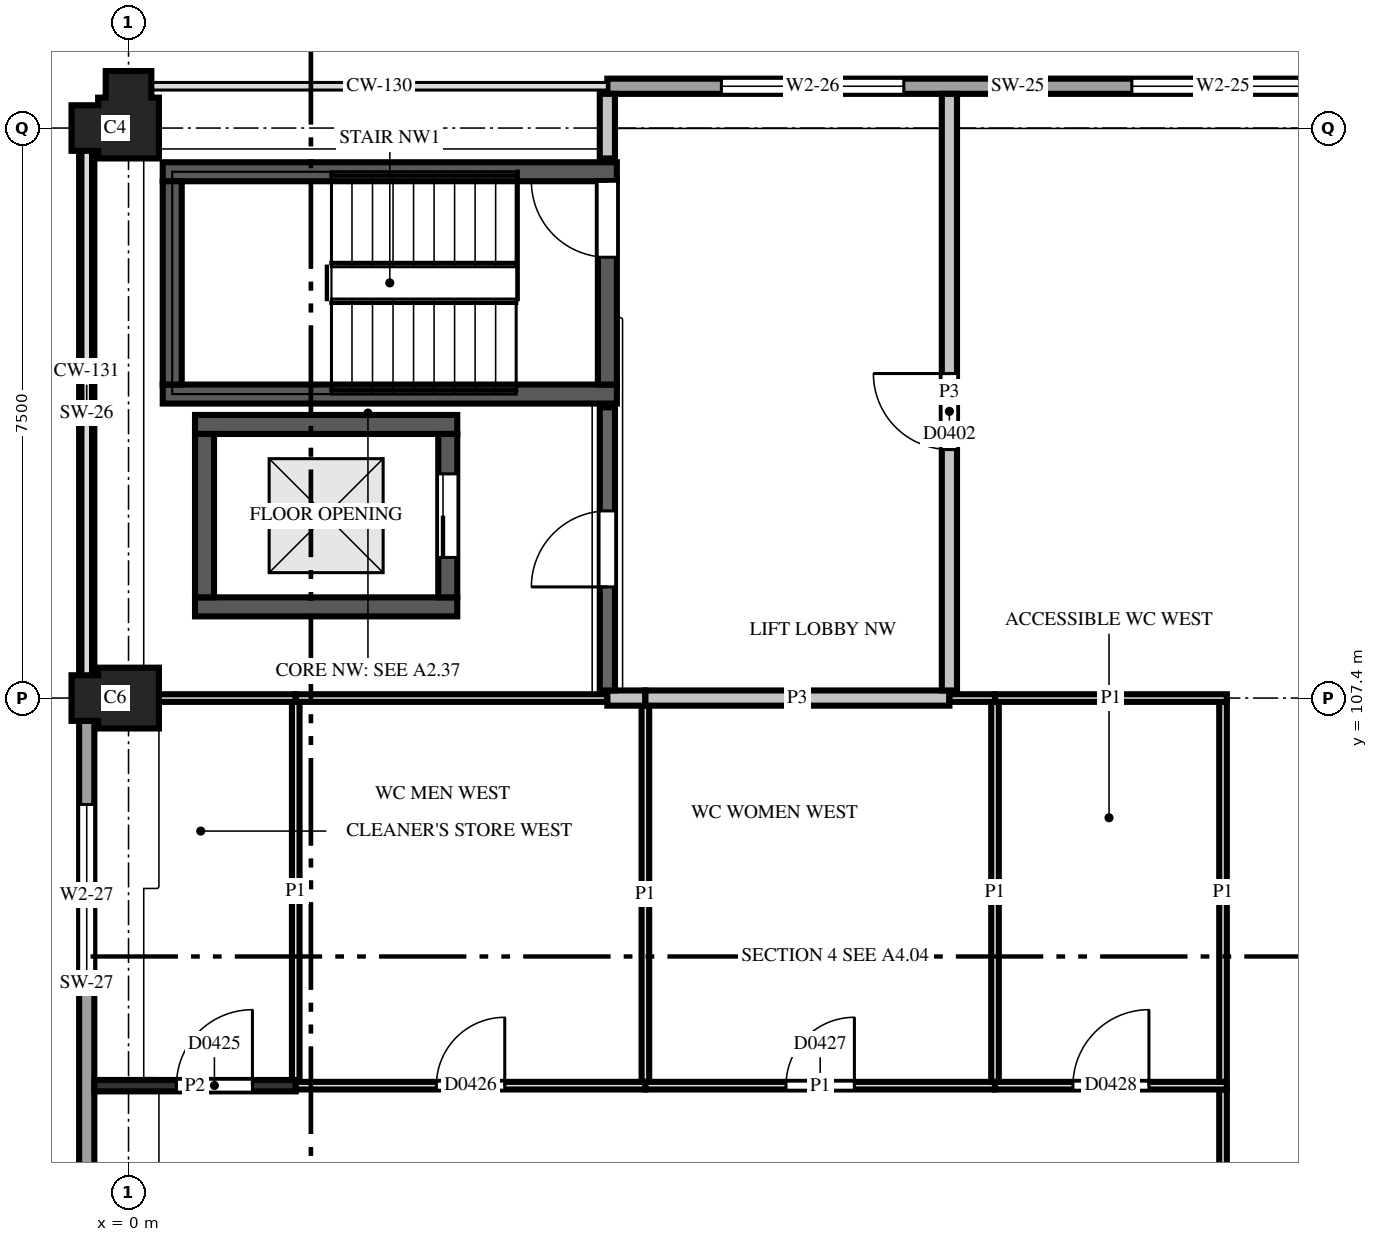
"""IFC4 building model, lengths in metres.
Left out: names, types, materials, properties, quantities, classifications, styles, units other than length and angle.
Written with IfcOpenShell. Run it as: python <this file> out.ifc"""

import sys

from ifc_helpers import new_model, si_unit, direction, frame, frame_2d, origin, place, context, subcontext, project, spatial, polyline, rectangle, outline, extrude, element, fill, save


model = new_model("IFC4")
c1 = context("Model", 3, precision=1e-05, world=origin(), true_north=direction((0.0, 1.0)))
c2 = subcontext(c1, "Body", "Model", "MODEL_VIEW")
j1 = project(units=[si_unit("LENGTHUNIT", "METRE"), si_unit("PLANEANGLEUNIT", "RADIAN")], contexts=[c1])
p1 = place(None, origin())
s1 = spatial("IfcSite", under=j1, at=p1, CompositionType="ELEMENT")
p2 = place(p1, origin())
s2 = spatial("IfcBuilding", under=s1, at=p2, CompositionType="ELEMENT")
p3 = place(p2, frame((0.0, 0.0, 15.6)))
s3 = spatial("IfcBuildingStorey", under=s2, at=p3, CompositionType="ELEMENT", Elevation=15.6)
p4 = place(p3, frame((0.0, 107.4, 0.0), z_axis=(0.0, 0.0, 1.0), x_axis=(-1.0, 0.0, 0.0)))
e1 = element("IfcColumn", 1, at=p4, inside=s3, PredefinedType="COLUMN", context=c2, shape_type="SweptSolid", body=[
    extrude(outline(polyline([(-0.4, -0.4), (0.4, -0.4), (0.4, -0.3), (0.75, -0.3), (0.75, 0.3), (0.4, 0.3), (0.4, 0.4), (-0.4, 0.4), (-0.4, -0.4)])), origin(), (0.0, 0.0, 1.0), 3.7),
])
p5 = place(p3, frame((0.0, 114.9, 0.0), z_axis=(0.0, 0.0, 1.0), x_axis=(0.0, 1.0, 0.0)))
e2 = element("IfcColumn", 2, at=p5, inside=s3, PredefinedType="COLUMN", context=c2, shape_type="SweptSolid", body=[
    extrude(outline(polyline([(-0.4, -0.4), (0.4, -0.4), (0.4, -0.3), (0.75, -0.3), (0.75, 0.3), (0.4, 0.3), (0.4, 0.4), (0.3, 0.4), (0.3, 0.75), (-0.3, 0.75), (-0.3, 0.4), (-0.4, 0.4), (-0.4, -0.4)])), origin(), (0.0, 0.0, 1.0), 3.7),
])
for number, where, z_axis, x_axis in (
    (3, (0.875, 108.6, 0.0), (0.0, 0.0, 1.0), (1.0, 0.0, 0.0)),
    (4, (0.875, 111.0, 0.0), (0.0, 0.0, 1.0), (1.0, 0.0, 0.0)),
):
    element("IfcWall", number, at=place(p3, frame(where, z_axis=z_axis, x_axis=x_axis)), inside=s3, PredefinedType="SHEAR", context=c2, shape_type="SweptSolid", body=[
        extrude(rectangle(XDim=3.45, YDim=0.25, at=frame_2d((1.725, 0.0))), origin(), (0.0, 0.0, 1.0), 3.7),
    ])
for number, where, z_axis, x_axis in (
    (5, (0.45, 111.4, 0.0), (0.0, 0.0, 1.0), (1.0, 0.0, 0.0)),
    (6, (0.45, 114.325, 0.0), (0.0, 0.0, 1.0), (1.0, 0.0, 0.0)),
):
    element("IfcWall", number, at=place(p3, frame(where, z_axis=z_axis, x_axis=x_axis)), inside=s3, PredefinedType="SHEAR", context=c2, shape_type="SweptSolid", body=[
        extrude(rectangle(XDim=5.975, YDim=0.25, at=frame_2d((2.988, 0.0))), origin(), (0.0, 0.0, 1.0), 3.7),
    ])
p6 = place(p3, frame((0.575, 111.525, 0.0), z_axis=(0.0, 0.0, 1.0), x_axis=(0.0, 1.0, 0.0)))
e7 = element("IfcWall", 7, at=p6, inside=s3, PredefinedType="SHEAR", context=c2, shape_type="SweptSolid", body=[
    extrude(rectangle(XDim=2.675, YDim=0.25, at=frame_2d((1.337, 0.0))), origin(), (0.0, 0.0, 1.0), 3.7),
])
p7 = place(p3, frame((1.0, 108.725, 0.0), z_axis=(0.0, 0.0, 1.0), x_axis=(0.0, 1.0, 0.0)))
e8 = element("IfcWall", 8, at=p7, inside=s3, PredefinedType="SHEAR", context=c2, shape_type="SweptSolid", body=[
    extrude(rectangle(XDim=2.15, YDim=0.25, at=frame_2d((1.075, 0.0))), origin(), (0.0, 0.0, 1.0), 3.7),
])
p8 = place(p3, frame((4.2, 108.725, 0.0), z_axis=(0.0, 0.0, 1.0), x_axis=(0.0, 1.0, 0.0)))
e9 = element("IfcWall", 9, at=p8, inside=s3, PredefinedType="SHEAR", context=c2, shape_type="SweptSolid", body=[
    extrude(rectangle(XDim=2.15, YDim=0.25, at=frame_2d((1.075, 0.0))), origin(), (0.0, 0.0, 1.0), 3.7),
])
p9 = place(p8, frame((0.525, 0.0, 0.0)))
e10 = element("IfcOpeningElement", 10, at=p9, cuts=e9, PredefinedType="OPENING", context=c2, shape_type="SweptSolid", body=[
    extrude(rectangle(XDim=1.1, YDim=2.1, at=frame_2d((0.55, 1.05))), frame((0.0, 0.135, 0.0), z_axis=(0.0, -1.0, 0.0), x_axis=(1.0, 0.0, 0.0)), (0.0, 0.0, 1.0), 0.27),
])
p10 = place(p3, frame((6.3, 111.525, 0.0), z_axis=(0.0, 0.0, 1.0), x_axis=(0.0, 1.0, 0.0)))
e11 = element("IfcWall", 11, at=p10, inside=s3, PredefinedType="SHEAR", context=c2, shape_type="SweptSolid", body=[
    extrude(rectangle(XDim=2.675, YDim=0.25, at=frame_2d((1.337, 0.0))), origin(), (0.0, 0.0, 1.0), 3.7),
])
p11 = place(p10, frame((1.675, 0.0, 0.0)))
e12 = element("IfcOpeningElement", 12, at=p11, cuts=e11, PredefinedType="OPENING", context=c2, shape_type="SweptSolid", body=[
    extrude(rectangle(XDim=1.0, YDim=2.1, at=frame_2d((0.5, 1.05))), frame((0.0, 0.135, 0.0), z_axis=(0.0, -1.0, 0.0), x_axis=(1.0, 0.0, 0.0)), (0.0, 0.0, 1.0), 0.27),
])
p12 = place(p3, frame((17.1, 115.45, 0.0), z_axis=(0.0, 0.0, 1.0), x_axis=(-1.0, 0.0, 0.0)))
e13 = element("IfcWall", 13, at=p12, inside=s3, PredefinedType="SOLIDWALL", context=c2, shape_type="SweptSolid", body=[
    extrude(rectangle(XDim=10.8, YDim=0.2, at=frame_2d((5.4, 0.0))), origin(), (0.0, 0.0, 1.0), 1.7),
])
p13 = place(p12, frame((1.5, 0.0, 0.55)))
e14 = element("IfcOpeningElement", 14, at=p13, cuts=e13, PredefinedType="OPENING", context=c2, shape_type="SweptSolid", body=[
    extrude(rectangle(XDim=2.4, YDim=1.0, at=frame_2d((1.2, 0.5))), frame((0.0, 0.11, 0.0), z_axis=(0.0, -1.0, 0.0), x_axis=(1.0, 0.0, 0.0)), (0.0, 0.0, 1.0), 0.22),
])
p14 = place(p12, frame((6.9, 0.0, 0.55)))
e15 = element("IfcOpeningElement", 15, at=p14, cuts=e13, PredefinedType="OPENING", context=c2, shape_type="SweptSolid", body=[
    extrude(rectangle(XDim=2.4, YDim=1.0, at=frame_2d((1.2, 0.5))), frame((0.0, 0.11, 0.0), z_axis=(0.0, -1.0, 0.0), x_axis=(1.0, 0.0, 0.0)), (0.0, 0.0, 1.0), 0.22),
])
p15 = place(p3, frame((-0.55, 114.6, 0.0), z_axis=(0.0, 0.0, 1.0), x_axis=(0.0, -1.0, 0.0)))
e16 = element("IfcWall", 16, at=p15, inside=s3, PredefinedType="SOLIDWALL", context=c2, shape_type="SweptSolid", body=[
    extrude(rectangle(XDim=6.9, YDim=0.2, at=frame_2d((3.45, 0.0))), origin(), (0.0, 0.0, 1.0), 2.3),
])
p16 = place(p3, frame((-0.55, 107.1, 0.0), z_axis=(0.0, 0.0, 1.0), x_axis=(0.0, -1.0, 0.0)))
e17 = element("IfcWall", 17, at=p16, inside=s3, PredefinedType="SOLIDWALL", context=c2, shape_type="SweptSolid", body=[
    extrude(rectangle(XDim=6.9, YDim=0.2, at=frame_2d((3.45, 0.0))), origin(), (0.0, 0.0, 1.0), 2.3),
])
p17 = place(p16, frame((1.1, 0.0, 0.55)))
e18 = element("IfcOpeningElement", 18, at=p17, cuts=e17, PredefinedType="OPENING", context=c2, shape_type="SweptSolid", body=[
    extrude(rectangle(XDim=2.4, YDim=1.0, at=frame_2d((1.2, 0.5))), frame((0.0, 0.11, 0.0), z_axis=(0.0, -1.0, 0.0), x_axis=(1.0, 0.0, 0.0)), (0.0, 0.0, 1.0), 0.22),
])
p18 = place(p3, frame((14.4, 99.95, 0.0), z_axis=(0.0, 0.0, 1.0), x_axis=(0.0, 1.0, 0.0)))
e19 = element("IfcWall", 19, at=p18, inside=s3, PredefinedType="PARTITIONING", context=c2, shape_type="SweptSolid", body=[
    extrude(rectangle(XDim=2.3, YDim=0.1, at=frame_2d((1.15, 0.0))), origin(), (0.0, 0.0, 1.0), 2.88),
])
p19 = place(p3, frame((2.2, 102.3, 0.0), z_axis=(0.0, 0.0, 1.0), x_axis=(-1.0, 0.0, 0.0)))
e20 = element("IfcWall", 20, at=p19, inside=s3, PredefinedType="PARTITIONING", context=c2, shape_type="SweptSolid", body=[
    extrude(rectangle(XDim=2.65, YDim=0.15, at=frame_2d((1.325, 0.0))), origin(), (0.0, 0.0, 1.0), 2.88),
])
p20 = place(p19, frame((0.57, 0.0, 0.0)))
e21 = element("IfcOpeningElement", 21, at=p20, cuts=e20, PredefinedType="OPENING", context=c2, shape_type="SweptSolid", body=[
    extrude(rectangle(XDim=1.0, YDim=2.1, at=frame_2d((0.5, 1.05))), frame((0.0, 0.085, 0.0), z_axis=(0.0, -1.0, 0.0), x_axis=(1.0, 0.0, 0.0)), (0.0, 0.0, 1.0), 0.17),
])
p21 = place(p3, frame((2.2, 102.375, 0.0), z_axis=(0.0, 0.0, 1.0), x_axis=(0.0, 1.0, 0.0)))
e22 = element("IfcWall", 22, at=p21, inside=s3, PredefinedType="PARTITIONING", context=c2, shape_type="SweptSolid", body=[
    extrude(rectangle(XDim=4.975, YDim=0.1, at=frame_2d((2.488, 0.0))), origin(), (0.0, 0.0, 1.0), 2.88),
])
p22 = place(p3, frame((6.8, 102.3, 0.0), z_axis=(0.0, 0.0, 1.0), x_axis=(-1.0, 0.0, 0.0)))
e23 = element("IfcWall", 23, at=p22, inside=s3, PredefinedType="PARTITIONING", context=c2, shape_type="SweptSolid", body=[
    extrude(rectangle(XDim=4.6, YDim=0.1, at=frame_2d((2.3, 0.0))), origin(), (0.0, 0.0, 1.0), 2.88),
])
p23 = place(p22, frame((1.85, 0.0, 0.0)))
e24 = element("IfcOpeningElement", 24, at=p23, cuts=e23, PredefinedType="OPENING", context=c2, shape_type="SweptSolid", body=[
    extrude(rectangle(XDim=0.9, YDim=2.1, at=frame_2d((0.45, 1.05))), frame((0.0, 0.06, 0.0), z_axis=(0.0, -1.0, 0.0), x_axis=(1.0, 0.0, 0.0)), (0.0, 0.0, 1.0), 0.12),
])
p24 = place(p3, frame((6.8, 102.35, 0.0), z_axis=(0.0, 0.0, 1.0), x_axis=(0.0, 1.0, 0.0)))
e25 = element("IfcWall", 25, at=p24, inside=s3, PredefinedType="PARTITIONING", context=c2, shape_type="SweptSolid", body=[
    extrude(rectangle(XDim=4.95, YDim=0.1, at=frame_2d((2.475, 0.0))), origin(), (0.0, 0.0, 1.0), 2.88),
])
p25 = place(p3, frame((11.4, 102.3, 0.0), z_axis=(0.0, 0.0, 1.0), x_axis=(-1.0, 0.0, 0.0)))
e26 = element("IfcWall", 26, at=p25, inside=s3, PredefinedType="PARTITIONING", context=c2, shape_type="SweptSolid", body=[
    extrude(rectangle(XDim=4.6, YDim=0.1, at=frame_2d((2.3, 0.0))), origin(), (0.0, 0.0, 1.0), 2.88),
])
p26 = place(p25, frame((1.85, 0.0, 0.0)))
e27 = element("IfcOpeningElement", 27, at=p26, cuts=e26, PredefinedType="OPENING", context=c2, shape_type="SweptSolid", body=[
    extrude(rectangle(XDim=0.9, YDim=2.1, at=frame_2d((0.45, 1.05))), frame((0.0, 0.06, 0.0), z_axis=(0.0, -1.0, 0.0), x_axis=(1.0, 0.0, 0.0)), (0.0, 0.0, 1.0), 0.12),
])
p27 = place(p3, frame((11.4, 102.35, 0.0), z_axis=(0.0, 0.0, 1.0), x_axis=(0.0, 1.0, 0.0)))
e28 = element("IfcWall", 28, at=p27, inside=s3, PredefinedType="PARTITIONING", context=c2, shape_type="SweptSolid", body=[
    extrude(rectangle(XDim=5.0, YDim=0.1, at=frame_2d((2.5, 0.0))), origin(), (0.0, 0.0, 1.0), 2.88),
])
p28 = place(p3, frame((14.45, 102.3, 0.0), z_axis=(0.0, 0.0, 1.0), x_axis=(-1.0, 0.0, 0.0)))
e29 = element("IfcWall", 29, at=p28, inside=s3, PredefinedType="PARTITIONING", context=c2, shape_type="SweptSolid", body=[
    extrude(rectangle(XDim=3.05, YDim=0.1, at=frame_2d((1.525, 0.0))), origin(), (0.0, 0.0, 1.0), 2.88),
])
p29 = place(p28, frame((1.025, 0.0, 0.0)))
e30 = element("IfcOpeningElement", 30, at=p29, cuts=e29, PredefinedType="OPENING", context=c2, shape_type="SweptSolid", body=[
    extrude(rectangle(XDim=1.0, YDim=2.1, at=frame_2d((0.5, 1.05))), frame((0.0, 0.06, 0.0), z_axis=(0.0, -1.0, 0.0), x_axis=(1.0, 0.0, 0.0)), (0.0, 0.0, 1.0), 0.12),
])
p30 = place(p3, frame((14.4, 102.35, 0.0), z_axis=(0.0, 0.0, 1.0), x_axis=(0.0, 1.0, 0.0)))
e31 = element("IfcWall", 31, at=p30, inside=s3, PredefinedType="PARTITIONING", context=c2, shape_type="SweptSolid", body=[
    extrude(rectangle(XDim=5.0, YDim=0.1, at=frame_2d((2.5, 0.0))), origin(), (0.0, 0.0, 1.0), 2.88),
])
p31 = place(p3, frame((2.2, 107.4, 0.0), z_axis=(0.0, 0.0, 1.0), x_axis=(-1.0, 0.0, 0.0)))
e32 = element("IfcWall", 32, at=p31, inside=s3, PredefinedType="PARTITIONING", context=c2, shape_type="SweptSolid", body=[
    extrude(rectangle(XDim=2.14, YDim=0.1, at=frame_2d((1.07, 0.0))), origin(), (0.0, 0.0, 1.0), 2.88),
])
p32 = place(p3, frame((6.3, 107.4, 0.0), z_axis=(0.0, 0.0, 1.0), x_axis=(-1.0, 0.0, 0.0)))
e33 = element("IfcWall", 33, at=p32, inside=s3, PredefinedType="PARTITIONING", context=c2, shape_type="SweptSolid", body=[
    extrude(rectangle(XDim=4.1, YDim=0.1, at=frame_2d((2.05, 0.0))), origin(), (0.0, 0.0, 1.0), 2.88),
])
p33 = place(p3, frame((6.3, 107.4, 0.0), z_axis=(0.0, 0.0, 1.0), x_axis=(1.0, 0.0, 0.0)))
e34 = element("IfcWall", 34, at=p33, inside=s3, PredefinedType="PARTITIONING", context=c2, shape_type="SweptSolid", body=[
    extrude(rectangle(XDim=0.5, YDim=0.2, at=frame_2d((0.25, 0.0))), origin(), (0.0, 0.0, 1.0), 2.88),
])
p34 = place(p3, frame((6.8, 107.4, 0.0), z_axis=(0.0, 0.0, 1.0), x_axis=(1.0, 0.0, 0.0)))
e35 = element("IfcWall", 35, at=p34, inside=s3, PredefinedType="PARTITIONING", context=c2, shape_type="SweptSolid", body=[
    extrude(rectangle(XDim=4.0, YDim=0.2, at=frame_2d((2.0, 0.0))), origin(), (0.0, 0.0, 1.0), 2.88),
])
p35 = place(p3, frame((10.8, 107.5, 0.0), z_axis=(0.0, 0.0, 1.0), x_axis=(0.0, 1.0, 0.0)))
e36 = element("IfcWall", 36, at=p35, inside=s3, PredefinedType="PARTITIONING", context=c2, shape_type="SweptSolid", body=[
    extrude(rectangle(XDim=7.85, YDim=0.2, at=frame_2d((3.925, 0.0))), origin(), (0.0, 0.0, 1.0), 2.88),
])
p36 = place(p35, frame((3.17, 0.0, 0.0)))
e37 = element("IfcOpeningElement", 37, at=p36, cuts=e36, PredefinedType="OPENING", context=c2, shape_type="SweptSolid", body=[
    extrude(rectangle(XDim=1.0, YDim=2.1, at=frame_2d((0.5, 1.05))), frame((0.0, 0.11, 0.0), z_axis=(0.0, -1.0, 0.0), x_axis=(1.0, 0.0, 0.0)), (0.0, 0.0, 1.0), 0.22),
])
p37 = place(p3, frame((11.4, 107.4, 0.0), z_axis=(0.0, 0.0, 1.0), x_axis=(-1.0, 0.0, 0.0)))
e38 = element("IfcWall", 38, at=p37, inside=s3, PredefinedType="PARTITIONING", context=c2, shape_type="SweptSolid", body=[
    extrude(rectangle(XDim=0.6, YDim=0.1, at=frame_2d((0.3, 0.0))), origin(), (0.0, 0.0, 1.0), 2.88),
])
p38 = place(p3, frame((14.45, 107.4, 0.0), z_axis=(0.0, 0.0, 1.0), x_axis=(-1.0, 0.0, 0.0)))
e39 = element("IfcWall", 39, at=p38, inside=s3, PredefinedType="PARTITIONING", context=c2, shape_type="SweptSolid", body=[
    extrude(rectangle(XDim=3.05, YDim=0.1, at=frame_2d((1.525, 0.0))), origin(), (0.0, 0.0, 1.0), 2.88),
])
p39 = place(p3, frame((6.3, 111.225, 0.0), z_axis=(0.0, 0.0, 1.0), x_axis=(0.0, -1.0, 0.0)))
e40 = element("IfcWall", 40, at=p39, inside=s3, PredefinedType="PARTITIONING", context=c2, shape_type="SweptSolid", body=[
    extrude(rectangle(XDim=3.725, YDim=0.2, at=frame_2d((1.863, 0.0))), origin(), (0.0, 0.0, 1.0), 2.88),
])
p40 = place(p39, frame((1.363, 0.0, 0.0)))
e41 = element("IfcOpeningElement", 41, at=p40, cuts=e40, PredefinedType="OPENING", context=c2, shape_type="SweptSolid", body=[
    extrude(rectangle(XDim=1.0, YDim=2.1, at=frame_2d((0.5, 1.05))), frame((0.0, 0.11, 0.0), z_axis=(0.0, -1.0, 0.0), x_axis=(1.0, 0.0, 0.0)), (0.0, 0.0, 1.0), 0.22),
])
p41 = place(p3, frame((6.3, 115.35, 0.0), z_axis=(0.0, 0.0, 1.0), x_axis=(0.0, -1.0, 0.0)))
e42 = element("IfcWall", 42, at=p41, inside=s3, PredefinedType="PARTITIONING", context=c2, shape_type="SweptSolid", body=[
    extrude(rectangle(XDim=0.85, YDim=0.2, at=frame_2d((0.425, 0.0))), origin(), (0.0, 0.0, 1.0), 2.88),
])
p42 = place(p13, origin())
e43 = element("IfcWindow", 43, at=p42, inside=s3, PartitioningType="SINGLE_PANEL", PredefinedType="WINDOW", context=c2, shape_type="SweptSolid", body=[
    extrude(rectangle(XDim=2.4, YDim=1.0, at=frame_2d((1.2, 0.5))), frame((0.0, 0.03, 0.0), z_axis=(0.0, -1.0, 0.0), x_axis=(1.0, 0.0, 0.0)), (0.0, 0.0, 1.0), 0.06),
])
fill(e14, e43)
p43 = place(p14, origin())
e44 = element("IfcWindow", 44, at=p43, inside=s3, PartitioningType="SINGLE_PANEL", PredefinedType="WINDOW", context=c2, shape_type="SweptSolid", body=[
    extrude(rectangle(XDim=2.4, YDim=1.0, at=frame_2d((1.2, 0.5))), frame((0.0, 0.03, 0.0), z_axis=(0.0, -1.0, 0.0), x_axis=(1.0, 0.0, 0.0)), (0.0, 0.0, 1.0), 0.06),
])
fill(e15, e44)
p44 = place(p17, origin())
e45 = element("IfcWindow", 45, at=p44, inside=s3, PartitioningType="SINGLE_PANEL", PredefinedType="WINDOW", context=c2, shape_type="SweptSolid", body=[
    extrude(rectangle(XDim=2.4, YDim=1.0, at=frame_2d((1.2, 0.5))), frame((0.0, 0.03, 0.0), z_axis=(0.0, -1.0, 0.0), x_axis=(1.0, 0.0, 0.0)), (0.0, 0.0, 1.0), 0.06),
])
fill(e18, e45)
p45 = place(p36, origin())
e46 = element("IfcDoor", 46, at=p45, inside=s3, OperationType="SINGLE_SWING_LEFT", PredefinedType="DOOR", context=c2, shape_type="SweptSolid", body=[
    extrude(rectangle(XDim=1.0, YDim=2.1, at=frame_2d((0.5, 1.05))), frame((0.0, 0.025, 0.0), z_axis=(0.0, -1.0, 0.0), x_axis=(1.0, 0.0, 0.0)), (0.0, 0.0, 1.0), 0.05),
])
fill(e37, e46)
p46 = place(p20, origin())
e47 = element("IfcDoor", 47, at=p46, inside=s3, OperationType="SINGLE_SWING_LEFT", PredefinedType="DOOR", context=c2, shape_type="SweptSolid", body=[
    extrude(rectangle(XDim=1.0, YDim=2.1, at=frame_2d((0.5, 1.05))), frame((0.0, 0.025, 0.0), z_axis=(0.0, -1.0, 0.0), x_axis=(1.0, 0.0, 0.0)), (0.0, 0.0, 1.0), 0.05),
])
fill(e21, e47)
p47 = place(p23, origin())
e48 = element("IfcDoor", 48, at=p47, inside=s3, OperationType="SINGLE_SWING_LEFT", PredefinedType="DOOR", context=c2, shape_type="SweptSolid", body=[
    extrude(rectangle(XDim=0.9, YDim=2.1, at=frame_2d((0.45, 1.05))), frame((0.0, 0.025, 0.0), z_axis=(0.0, -1.0, 0.0), x_axis=(1.0, 0.0, 0.0)), (0.0, 0.0, 1.0), 0.05),
])
fill(e24, e48)
p48 = place(p26, origin())
e49 = element("IfcDoor", 49, at=p48, inside=s3, OperationType="SINGLE_SWING_LEFT", PredefinedType="DOOR", context=c2, shape_type="SweptSolid", body=[
    extrude(rectangle(XDim=0.9, YDim=2.1, at=frame_2d((0.45, 1.05))), frame((0.0, 0.025, 0.0), z_axis=(0.0, -1.0, 0.0), x_axis=(1.0, 0.0, 0.0)), (0.0, 0.0, 1.0), 0.05),
])
fill(e27, e49)
p49 = place(p29, origin())
e50 = element("IfcDoor", 50, at=p49, inside=s3, OperationType="SINGLE_SWING_LEFT", PredefinedType="DOOR", context=c2, shape_type="SweptSolid", body=[
    extrude(rectangle(XDim=1.0, YDim=2.1, at=frame_2d((0.5, 1.05))), frame((0.0, 0.025, 0.0), z_axis=(0.0, -1.0, 0.0), x_axis=(1.0, 0.0, 0.0)), (0.0, 0.0, 1.0), 0.05),
])
fill(e30, e50)
p50 = place(p9, origin())
e51 = element("IfcDoor", 51, at=p50, inside=s3, OperationType="SLIDING_TO_LEFT", PredefinedType="DOOR", context=c2, shape_type="SweptSolid", body=[
    extrude(rectangle(XDim=1.1, YDim=2.1, at=frame_2d((0.55, 1.05))), frame((0.0, 0.025, 0.0), z_axis=(0.0, -1.0, 0.0), x_axis=(1.0, 0.0, 0.0)), (0.0, 0.0, 1.0), 0.05),
])
fill(e10, e51)
p51 = place(p11, origin())
e52 = element("IfcDoor", 52, at=p51, inside=s3, OperationType="SINGLE_SWING_LEFT", PredefinedType="DOOR", context=c2, shape_type="SweptSolid", body=[
    extrude(rectangle(XDim=1.0, YDim=2.1, at=frame_2d((0.5, 1.05))), frame((0.0, 0.025, 0.0), z_axis=(0.0, -1.0, 0.0), x_axis=(1.0, 0.0, 0.0)), (0.0, 0.0, 1.0), 0.05),
])
fill(e12, e52)
p52 = place(p40, origin())
e53 = element("IfcDoor", 53, at=p52, inside=s3, OperationType="SINGLE_SWING_RIGHT", PredefinedType="DOOR", context=c2, shape_type="SweptSolid", body=[
    extrude(rectangle(XDim=1.0, YDim=2.1, at=frame_2d((0.5, 1.05))), frame((0.0, 0.025, 0.0), z_axis=(0.0, -1.0, 0.0), x_axis=(1.0, 0.0, 0.0)), (0.0, 0.0, 1.0), 0.05),
])
fill(e41, e53)
save(model, sys.argv[1])
